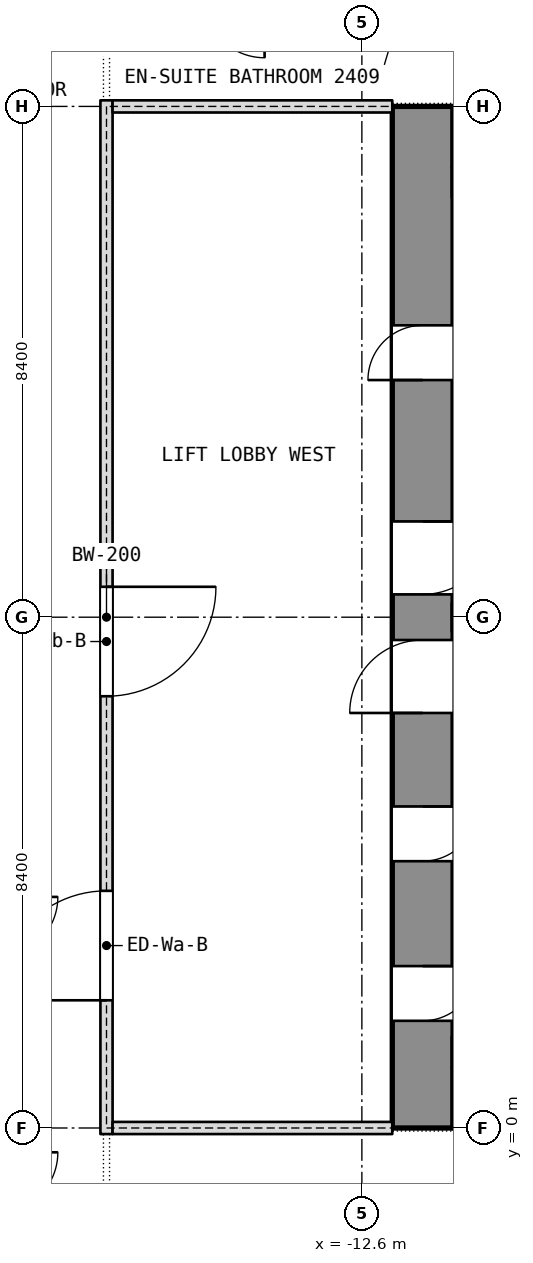
"""IFC4 building model, lengths in metres.
Left out: names, types, materials, properties, quantities, classifications, styles, units other than length and angle.
Written with IfcOpenShell. Run it as: python <this file> out.ifc"""

import sys

from ifc_helpers import new_model, si_unit, direction, frame, frame_2d, origin, place, context, subcontext, project, spatial, rectangle, extrude, element, fill, save


model = new_model("IFC4")
c1 = context("Model", 3, precision=1e-05, world=origin(), true_north=direction((0.0, 1.0)))
c2 = subcontext(c1, "Body", "Model", "MODEL_VIEW")
j1 = project(units=[si_unit("LENGTHUNIT", "METRE"), si_unit("PLANEANGLEUNIT", "RADIAN")], contexts=[c1])
p1 = place(None, origin())
s1 = spatial("IfcSite", under=j1, at=p1, CompositionType="ELEMENT")
p2 = place(p1, origin())
s2 = spatial("IfcBuilding", under=s1, at=p2, CompositionType="ELEMENT")
p3 = place(p2, frame((0.0, 0.0, 112.1)))
s3 = spatial("IfcBuildingStorey", under=s2, at=p3, CompositionType="ELEMENT", Elevation=112.1)
p4 = place(p3, frame((-11.6, 0.0, 0.0), z_axis=(0.0, 0.0, 1.0), x_axis=(0.0, 1.0, 0.0)))
e1 = element("IfcWall", 1, at=p4, inside=s3, PredefinedType="SHEAR", context=c2, shape_type="SweptSolid", body=[
    extrude(rectangle(XDim=16.8, YDim=1.0, at=frame_2d((8.4, 0.0))), origin(), (0.0, 0.0, 1.0), 3.6),
])
p5 = place(p4, frame((1.762, 0.0, 0.0)))
e2 = element("IfcOpeningElement", 2, at=p5, cuts=e1, PredefinedType="OPENING", context=c2, shape_type="SweptSolid", body=[
    extrude(rectangle(XDim=0.9, YDim=2.1, at=frame_2d((0.45, 1.05))), frame((0.0, 0.5, 0.0), z_axis=(0.0, -1.0, 0.0), x_axis=(1.0, 0.0, 0.0)), (0.0, 0.0, 1.0), 1.0),
])
p6 = place(p4, frame((4.387, 0.0, 0.0)))
e3 = element("IfcOpeningElement", 3, at=p6, cuts=e1, PredefinedType="OPENING", context=c2, shape_type="SweptSolid", body=[
    extrude(rectangle(XDim=0.9, YDim=2.1, at=frame_2d((0.45, 1.05))), frame((0.0, 0.5, 0.0), z_axis=(0.0, -1.0, 0.0), x_axis=(1.0, 0.0, 0.0)), (0.0, 0.0, 1.0), 1.0),
])
p7 = place(p4, frame((6.825, 0.0, 0.0)))
e4 = element("IfcOpeningElement", 4, at=p7, cuts=e1, PredefinedType="OPENING", context=c2, shape_type="SweptSolid", body=[
    extrude(rectangle(XDim=1.2, YDim=2.1, at=frame_2d((0.6, 1.05))), frame((0.0, 0.5, 0.0), z_axis=(0.0, -1.0, 0.0), x_axis=(1.0, 0.0, 0.0)), (0.0, 0.0, 1.0), 1.0),
])
p8 = place(p4, frame((12.3, 0.0, 0.0)))
e5 = element("IfcOpeningElement", 5, at=p8, cuts=e1, PredefinedType="OPENING", context=c2, shape_type="SweptSolid", body=[
    extrude(rectangle(XDim=0.9, YDim=2.1, at=frame_2d((0.45, 1.05))), frame((0.0, 0.5, 0.0), z_axis=(0.0, -1.0, 0.0), x_axis=(1.0, 0.0, 0.0)), (0.0, 0.0, 1.0), 1.0),
])
p9 = place(p4, frame((8.775, 0.0, 0.0)))
e6 = element("IfcOpeningElement", 6, at=p9, cuts=e1, PredefinedType="OPENING", context=c2, shape_type="SweptSolid", body=[
    extrude(rectangle(XDim=1.2, YDim=2.1, at=frame_2d((0.6, 1.05))), frame((0.0, 0.5, 0.0), z_axis=(0.0, -1.0, 0.0), x_axis=(1.0, 0.0, 0.0)), (0.0, 0.0, 1.0), 1.0),
])
p10 = place(p3, frame((-11.1, 8.4, 0.0), z_axis=(0.0, 0.0, 1.0), x_axis=(1.0, 0.0, 0.0)))
e7 = element("IfcWall", 7, at=p10, inside=s3, PredefinedType="SHEAR", context=c2, shape_type="SweptSolid", body=[
    extrude(rectangle(XDim=6.675, YDim=0.45, at=frame_2d((3.337, 0.0))), origin(), (0.0, 0.0, 1.0), 3.6),
])
p11 = place(p3, frame((-16.8, -0.1, 0.0), z_axis=(0.0, 0.0, 1.0), x_axis=(0.0, 1.0, 0.0)))
e8 = element("IfcWall", 8, at=p11, inside=s3, PredefinedType="PARTITIONING", context=c2, shape_type="SweptSolid", body=[
    extrude(rectangle(XDim=17.0, YDim=0.2, at=frame_2d((8.5, 0.0))), origin(), (0.0, 0.0, 1.0), 3.34),
])
p12 = place(p11, frame((2.2, 0.0, 0.0)))
e9 = element("IfcOpeningElement", 9, at=p12, cuts=e8, PredefinedType="OPENING", context=c2, shape_type="SweptSolid", body=[
    extrude(rectangle(XDim=1.8, YDim=2.1, at=frame_2d((0.9, 1.05))), frame((0.0, 0.1, 0.0), z_axis=(0.0, -1.0, 0.0), x_axis=(1.0, 0.0, 0.0)), (0.0, 0.0, 1.0), 0.2),
])
p13 = place(p11, frame((7.2, 0.0, 0.0)))
e10 = element("IfcOpeningElement", 10, at=p13, cuts=e8, PredefinedType="OPENING", context=c2, shape_type="SweptSolid", body=[
    extrude(rectangle(XDim=1.8, YDim=2.1, at=frame_2d((0.9, 1.05))), frame((0.0, 0.1, 0.0), z_axis=(0.0, -1.0, 0.0), x_axis=(1.0, 0.0, 0.0)), (0.0, 0.0, 1.0), 0.2),
])
for number, where, z_axis, x_axis in (
    (11, (-16.7, 0.0, 0.0), (0.0, 0.0, 1.0), (1.0, 0.0, 0.0)),
    (12, (-16.7, 16.8, 0.0), (0.0, 0.0, 1.0), (1.0, 0.0, 0.0)),
):
    element("IfcWall", number, at=place(p3, frame(where, z_axis=z_axis, x_axis=x_axis)), inside=s3, PredefinedType="PARTITIONING", context=c2, shape_type="SweptSolid", body=[
        extrude(rectangle(XDim=4.6, YDim=0.2, at=frame_2d((2.3, 0.0))), origin(), (0.0, 0.0, 1.0), 2.89),
    ])
p14 = place(p5, origin())
e13 = element("IfcDoor", 13, at=p14, inside=s3, OperationType="SINGLE_SWING_LEFT", PredefinedType="DOOR", context=c2, shape_type="SweptSolid", body=[
    extrude(rectangle(XDim=0.9, YDim=2.1, at=frame_2d((0.45, 1.05))), frame((0.0, 0.025, 0.0), z_axis=(0.0, -1.0, 0.0), x_axis=(1.0, 0.0, 0.0)), (0.0, 0.0, 1.0), 0.05),
])
fill(e2, e13)
p15 = place(p6, origin())
e14 = element("IfcDoor", 14, at=p15, inside=s3, OperationType="SINGLE_SWING_LEFT", PredefinedType="DOOR", context=c2, shape_type="SweptSolid", body=[
    extrude(rectangle(XDim=0.9, YDim=2.1, at=frame_2d((0.45, 1.05))), frame((0.0, 0.025, 0.0), z_axis=(0.0, -1.0, 0.0), x_axis=(1.0, 0.0, 0.0)), (0.0, 0.0, 1.0), 0.05),
])
fill(e3, e14)
p16 = place(p7, origin())
e15 = element("IfcDoor", 15, at=p16, inside=s3, OperationType="SINGLE_SWING_LEFT", PredefinedType="DOOR", context=c2, shape_type="SweptSolid", body=[
    extrude(rectangle(XDim=1.2, YDim=2.1, at=frame_2d((0.6, 1.05))), frame((0.0, 0.025, 0.0), z_axis=(0.0, -1.0, 0.0), x_axis=(1.0, 0.0, 0.0)), (0.0, 0.0, 1.0), 0.05),
])
fill(e4, e15)
p17 = place(p8, origin())
e16 = element("IfcDoor", 16, at=p17, inside=s3, OperationType="SINGLE_SWING_LEFT", PredefinedType="DOOR", context=c2, shape_type="SweptSolid", body=[
    extrude(rectangle(XDim=0.9, YDim=2.1, at=frame_2d((0.45, 1.05))), frame((0.0, 0.025, 0.0), z_axis=(0.0, -1.0, 0.0), x_axis=(1.0, 0.0, 0.0)), (0.0, 0.0, 1.0), 0.05),
])
fill(e5, e16)
p18 = place(p9, origin())
e17 = element("IfcDoor", 17, at=p18, inside=s3, OperationType="SINGLE_SWING_LEFT", PredefinedType="DOOR", context=c2, shape_type="SweptSolid", body=[
    extrude(rectangle(XDim=1.2, YDim=2.1, at=frame_2d((0.6, 1.05))), frame((0.0, 0.025, 0.0), z_axis=(0.0, -1.0, 0.0), x_axis=(1.0, 0.0, 0.0)), (0.0, 0.0, 1.0), 0.05),
])
fill(e6, e17)
p19 = place(p12, origin())
e18 = element("IfcDoor", 18, at=p19, inside=s3, OperationType="DOUBLE_DOOR_SINGLE_SWING", PredefinedType="DOOR", context=c2, shape_type="SweptSolid", body=[
    extrude(rectangle(XDim=1.8, YDim=2.1, at=frame_2d((0.9, 1.05))), frame((0.0, 0.025, 0.0), z_axis=(0.0, -1.0, 0.0), x_axis=(1.0, 0.0, 0.0)), (0.0, 0.0, 1.0), 0.05),
])
fill(e9, e18)
p20 = place(p13, origin())
e19 = element("IfcDoor", 19, at=p20, inside=s3, OperationType="DOUBLE_DOOR_SINGLE_SWING", PredefinedType="DOOR", context=c2, shape_type="SweptSolid", body=[
    extrude(rectangle(XDim=1.8, YDim=2.1, at=frame_2d((0.9, 1.05))), frame((0.0, 0.025, 0.0), z_axis=(0.0, -1.0, 0.0), x_axis=(1.0, 0.0, 0.0)), (0.0, 0.0, 1.0), 0.05),
])
fill(e10, e19)
save(model, sys.argv[1])
